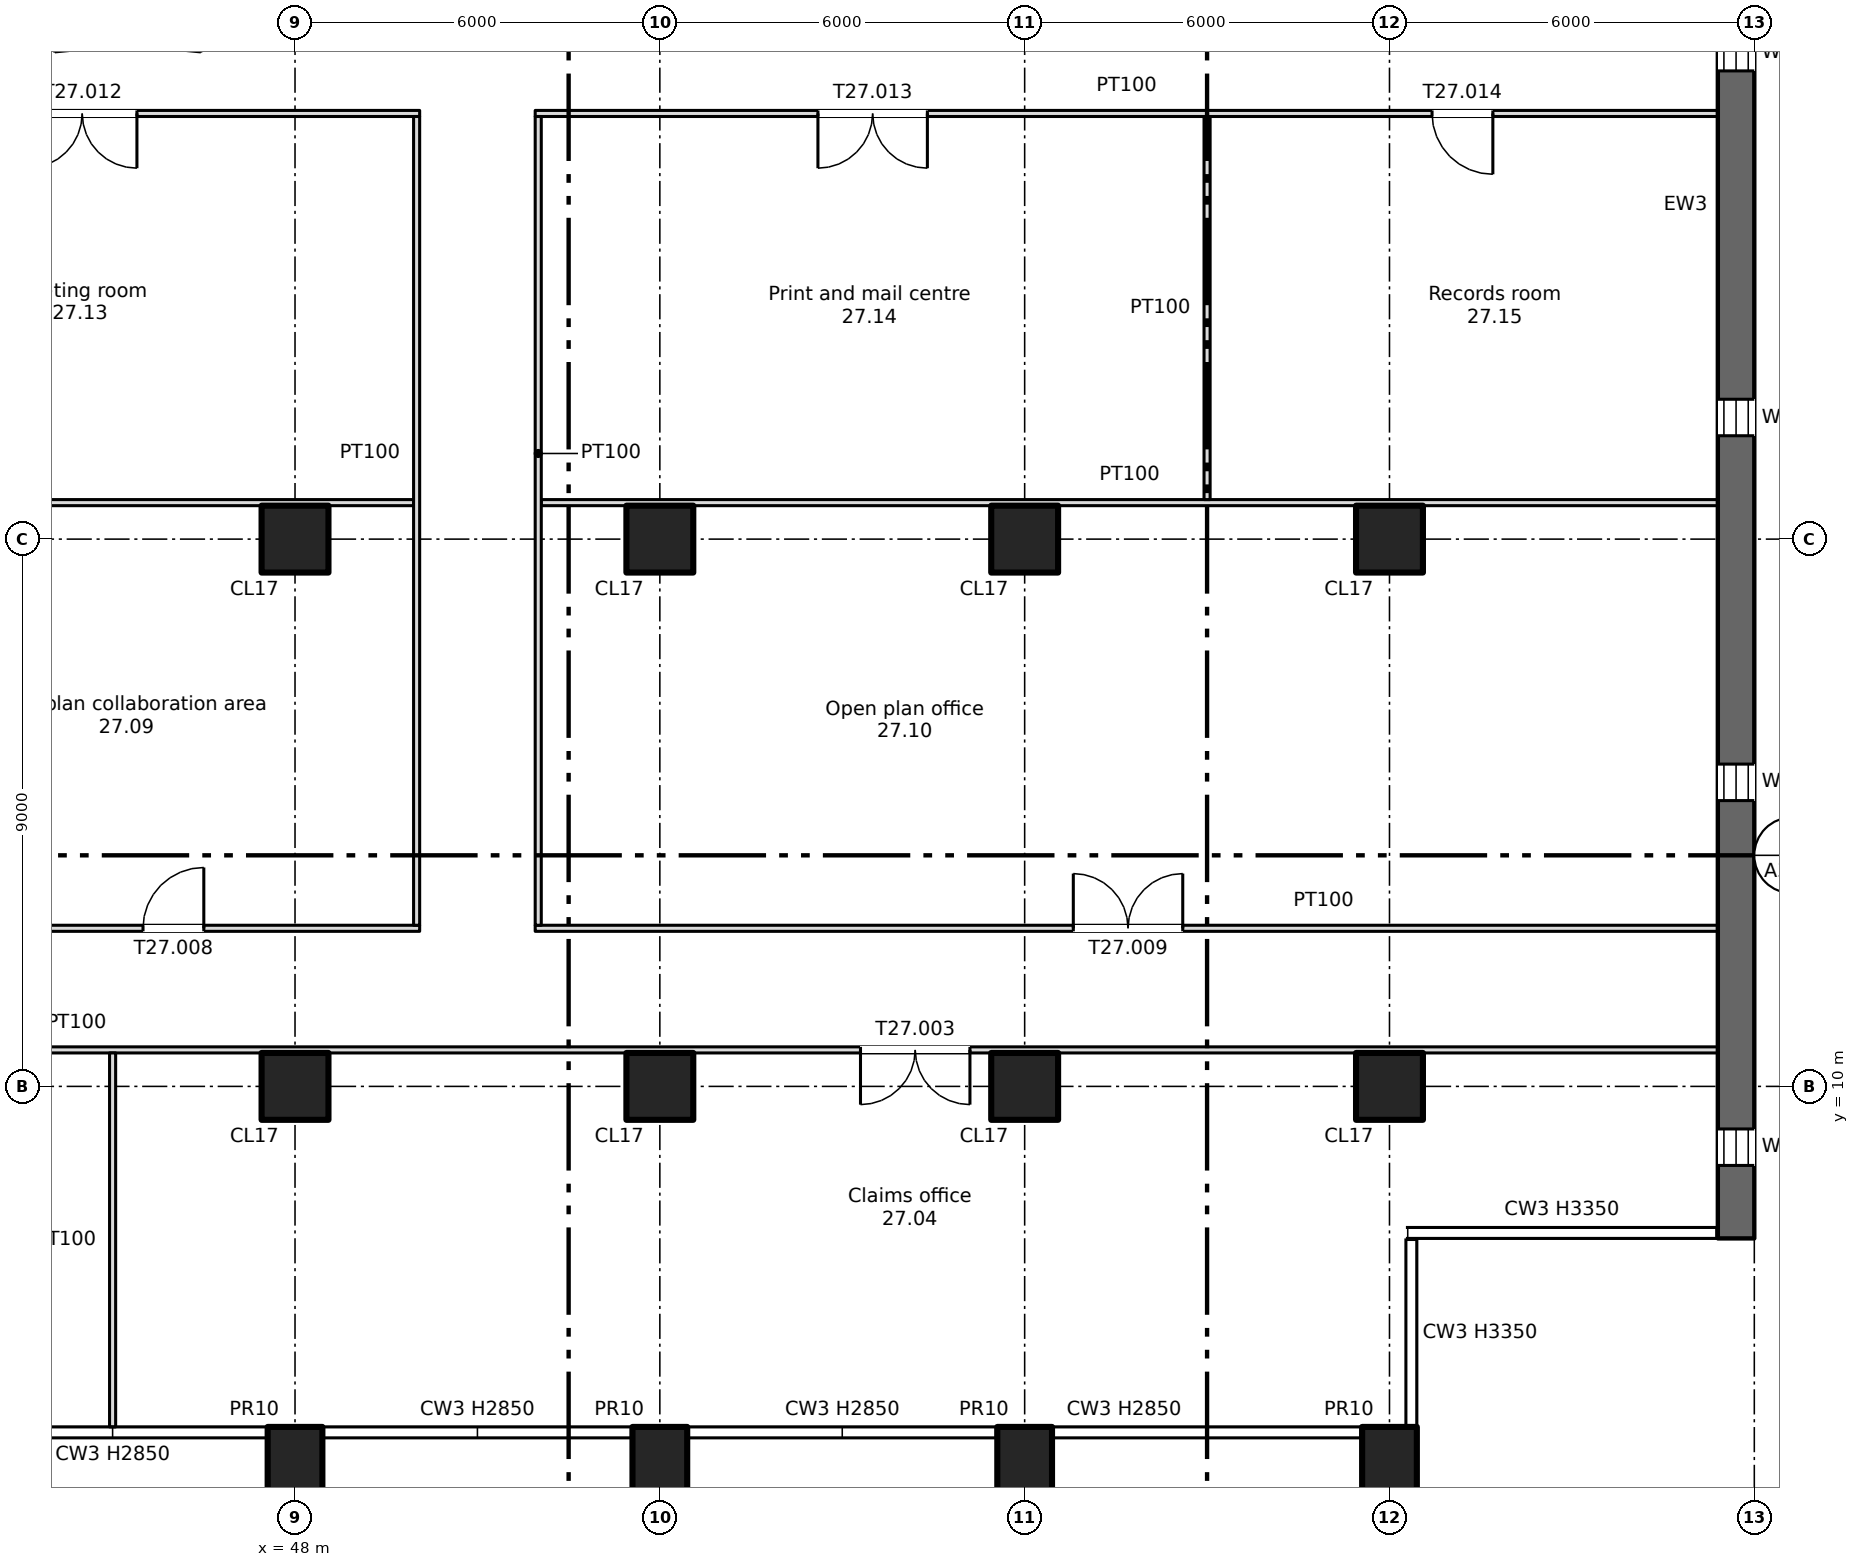
"""IFC4 building model, lengths in metres.
Left out: names, types, materials, properties, quantities, classifications, styles, units other than length and angle.
Written with IfcOpenShell. Run it as: python <this file> out.ifc"""

import sys

from ifc_helpers import new_model, si_unit, direction, frame, frame_2d, origin, origin_2d, place, context, subcontext, project, spatial, rectangle, extrude, element, fill, save


model = new_model("IFC4")
c1 = context("Model", 3, precision=1e-05, world=origin(), true_north=direction((0.0, 1.0)))
c2 = subcontext(c1, "Body", "Model", "MODEL_VIEW")
j1 = project(units=[si_unit("LENGTHUNIT", "METRE"), si_unit("PLANEANGLEUNIT", "RADIAN")], contexts=[c1])
p1 = place(None, origin())
s1 = spatial("IfcSite", under=j1, at=p1, CompositionType="ELEMENT")
p2 = place(p1, origin())
s2 = spatial("IfcBuilding", under=s1, at=p2, CompositionType="ELEMENT")
p3 = place(p2, frame((0.0, 0.0, 189.25)))
s3 = spatial("IfcBuildingStorey", under=s2, at=p3, CompositionType="ELEMENT", Elevation=189.25)
for number, where, z_axis, x_axis in (
    (1, (48.0, 3.7, -0.4), (0.0, 0.0, 1.0), (1.0, 0.0, 0.0)),
    (2, (54.0, 3.7, -0.4), (0.0, 0.0, 1.0), (1.0, 0.0, 0.0)),
    (3, (60.0, 3.7, -0.4), (0.0, 0.0, 1.0), (1.0, 0.0, 0.0)),
    (4, (66.0, 3.7, -0.4), (0.0, 0.0, 1.0), (1.0, 0.0, 0.0)),
):
    element("IfcColumn", number, at=place(p3, frame(where, z_axis=z_axis, x_axis=x_axis)), inside=s3, PredefinedType="COLUMN", context=c2, shape_type="SweptSolid", body=[
        extrude(rectangle(XDim=0.9, YDim=1.4, at=origin_2d()), origin(), (0.0, 0.0, 1.0), 3.75),
    ])
for number, where, z_axis, x_axis in (
    (5, (48.0, 10.0, 0.0), (0.0, 0.0, 1.0), (1.0, 0.0, 0.0)),
    (6, (48.0, 19.0, 0.0), (0.0, 0.0, 1.0), (1.0, 0.0, 0.0)),
    (7, (54.0, 10.0, 0.0), (0.0, 0.0, 1.0), (1.0, 0.0, 0.0)),
    (8, (54.0, 19.0, 0.0), (0.0, 0.0, 1.0), (1.0, 0.0, 0.0)),
    (9, (60.0, 10.0, 0.0), (0.0, 0.0, 1.0), (1.0, 0.0, 0.0)),
    (10, (60.0, 19.0, 0.0), (0.0, 0.0, 1.0), (1.0, 0.0, 0.0)),
    (11, (66.0, 10.0, 0.0), (0.0, 0.0, 1.0), (1.0, 0.0, 0.0)),
    (12, (66.0, 19.0, 0.0), (0.0, 0.0, 1.0), (1.0, 0.0, 0.0)),
):
    element("IfcColumn", number, at=place(p3, frame(where, z_axis=z_axis, x_axis=x_axis)), inside=s3, PredefinedType="COLUMN", context=c2, shape_type="SweptSolid", body=[
        extrude(rectangle(XDim=1.1, YDim=1.1, at=origin_2d()), origin(), (0.0, 0.0, 1.0), 3.35),
    ])
p4 = place(p3, frame((71.7, 7.5, 0.0), z_axis=(0.0, 0.0, 1.0), x_axis=(0.0, 1.0, 0.0)))
e13 = element("IfcWall", 13, at=p4, inside=s3, PredefinedType="SHEAR", context=c2, shape_type="SweptSolid", body=[
    extrude(rectangle(XDim=34.0, YDim=0.6, at=frame_2d((17.0, 0.0))), origin(), (0.0, 0.0, 1.0), 3.35),
])
p5 = place(p4, frame((1.2, 0.0, 0.6)))
e14 = element("IfcOpeningElement", 14, at=p5, cuts=e13, PredefinedType="OPENING", context=c2, shape_type="SweptSolid", body=[
    extrude(rectangle(XDim=0.6, YDim=2.4, at=frame_2d((0.3, 1.2))), frame((0.0, 0.31, 0.0), z_axis=(0.0, -1.0, 0.0), x_axis=(1.0, 0.0, 0.0)), (0.0, 0.0, 1.0), 0.62),
])
p6 = place(p4, frame((7.2, 0.0, 0.6)))
e15 = element("IfcOpeningElement", 15, at=p6, cuts=e13, PredefinedType="OPENING", context=c2, shape_type="SweptSolid", body=[
    extrude(rectangle(XDim=0.6, YDim=2.4, at=frame_2d((0.3, 1.2))), frame((0.0, 0.31, 0.0), z_axis=(0.0, -1.0, 0.0), x_axis=(1.0, 0.0, 0.0)), (0.0, 0.0, 1.0), 0.62),
])
p7 = place(p4, frame((13.2, 0.0, 0.6)))
e16 = element("IfcOpeningElement", 16, at=p7, cuts=e13, PredefinedType="OPENING", context=c2, shape_type="SweptSolid", body=[
    extrude(rectangle(XDim=0.6, YDim=2.4, at=frame_2d((0.3, 1.2))), frame((0.0, 0.31, 0.0), z_axis=(0.0, -1.0, 0.0), x_axis=(1.0, 0.0, 0.0)), (0.0, 0.0, 1.0), 0.62),
])
p8 = place(p4, frame((19.2, 0.0, 0.6)))
e17 = element("IfcOpeningElement", 17, at=p8, cuts=e13, PredefinedType="OPENING", context=c2, shape_type="SweptSolid", body=[
    extrude(rectangle(XDim=0.6, YDim=2.4, at=frame_2d((0.3, 1.2))), frame((0.0, 0.31, 0.0), z_axis=(0.0, -1.0, 0.0), x_axis=(1.0, 0.0, 0.0)), (0.0, 0.0, 1.0), 0.62),
])
p9 = place(p4, frame((25.2, 0.0, 0.6)))
e18 = element("IfcOpeningElement", 18, at=p9, cuts=e13, PredefinedType="OPENING", context=c2, shape_type="SweptSolid", body=[
    extrude(rectangle(XDim=0.6, YDim=2.4, at=frame_2d((0.3, 1.2))), frame((0.0, 0.31, 0.0), z_axis=(0.0, -1.0, 0.0), x_axis=(1.0, 0.0, 0.0)), (0.0, 0.0, 1.0), 0.62),
])
p10 = place(p4, frame((31.2, 0.0, 0.6)))
e19 = element("IfcOpeningElement", 19, at=p10, cuts=e13, PredefinedType="OPENING", context=c2, shape_type="SweptSolid", body=[
    extrude(rectangle(XDim=0.6, YDim=2.4, at=frame_2d((0.3, 1.2))), frame((0.0, 0.31, 0.0), z_axis=(0.0, -1.0, 0.0), x_axis=(1.0, 0.0, 0.0)), (0.0, 0.0, 1.0), 0.62),
])
p11 = place(p3, frame((6.6, 10.6, 0.0), z_axis=(0.0, 0.0, 1.0), x_axis=(1.0, 0.0, 0.0)))
e20 = element("IfcWall", 20, at=p11, inside=s3, PredefinedType="PARTITIONING", context=c2, shape_type="SweptSolid", body=[
    extrude(rectangle(XDim=64.8, YDim=0.1, at=frame_2d((32.4, 0.0))), origin(), (0.0, 0.0, 1.0), 3.35),
])
p12 = place(p11, frame((15.0, 0.0, 0.0)))
e21 = element("IfcOpeningElement", 21, at=p12, cuts=e20, PredefinedType="OPENING", context=c2, shape_type="SweptSolid", body=[
    extrude(rectangle(XDim=1.8, YDim=2.1, at=frame_2d((0.9, 1.05))), frame((0.0, 0.06, 0.0), z_axis=(0.0, -1.0, 0.0), x_axis=(1.0, 0.0, 0.0)), (0.0, 0.0, 1.0), 0.12),
])
p13 = place(p11, frame((30.0, 0.0, 0.0)))
e22 = element("IfcOpeningElement", 22, at=p13, cuts=e20, PredefinedType="OPENING", context=c2, shape_type="SweptSolid", body=[
    extrude(rectangle(XDim=1.8, YDim=2.1, at=frame_2d((0.9, 1.05))), frame((0.0, 0.06, 0.0), z_axis=(0.0, -1.0, 0.0), x_axis=(1.0, 0.0, 0.0)), (0.0, 0.0, 1.0), 0.12),
])
p14 = place(p11, frame((50.7, 0.0, 0.0)))
e23 = element("IfcOpeningElement", 23, at=p14, cuts=e20, PredefinedType="OPENING", context=c2, shape_type="SweptSolid", body=[
    extrude(rectangle(XDim=1.8, YDim=2.1, at=frame_2d((0.9, 1.05))), frame((0.0, 0.06, 0.0), z_axis=(0.0, -1.0, 0.0), x_axis=(1.0, 0.0, 0.0)), (0.0, 0.0, 1.0), 0.12),
])
p15 = place(p11, frame((3.7, 0.0, 0.0)))
e24 = element("IfcOpeningElement", 24, at=p15, cuts=e20, PredefinedType="OPENING", context=c2, shape_type="SweptSolid", body=[
    extrude(rectangle(XDim=1.0, YDim=2.1, at=frame_2d((0.5, 1.05))), frame((0.0, 0.06, 0.0), z_axis=(0.0, -1.0, 0.0), x_axis=(1.0, 0.0, 0.0)), (0.0, 0.0, 1.0), 0.12),
])
p16 = place(p3, frame((27.95, 12.6, 0.0), z_axis=(0.0, 0.0, 1.0), x_axis=(1.0, 0.0, 0.0)))
e25 = element("IfcWall", 25, at=p16, inside=s3, PredefinedType="PARTITIONING", context=c2, shape_type="SweptSolid", body=[
    extrude(rectangle(XDim=22.1, YDim=0.1, at=frame_2d((11.05, 0.0))), origin(), (0.0, 0.0, 1.0), 3.35),
])
p17 = place(p16, frame((3.55, 0.0, 0.0)))
e26 = element("IfcOpeningElement", 26, at=p17, cuts=e25, PredefinedType="OPENING", context=c2, shape_type="SweptSolid", body=[
    extrude(rectangle(XDim=1.0, YDim=2.1, at=frame_2d((0.5, 1.05))), frame((0.0, 0.06, 0.0), z_axis=(0.0, -1.0, 0.0), x_axis=(1.0, 0.0, 0.0)), (0.0, 0.0, 1.0), 0.12),
])
p18 = place(p16, frame((10.55, 0.0, 0.0)))
e27 = element("IfcOpeningElement", 27, at=p18, cuts=e25, PredefinedType="OPENING", context=c2, shape_type="SweptSolid", body=[
    extrude(rectangle(XDim=1.0, YDim=2.1, at=frame_2d((0.5, 1.05))), frame((0.0, 0.06, 0.0), z_axis=(0.0, -1.0, 0.0), x_axis=(1.0, 0.0, 0.0)), (0.0, 0.0, 1.0), 0.12),
])
p19 = place(p16, frame((17.55, 0.0, 0.0)))
e28 = element("IfcOpeningElement", 28, at=p19, cuts=e25, PredefinedType="OPENING", context=c2, shape_type="SweptSolid", body=[
    extrude(rectangle(XDim=1.0, YDim=2.1, at=frame_2d((0.5, 1.05))), frame((0.0, 0.06, 0.0), z_axis=(0.0, -1.0, 0.0), x_axis=(1.0, 0.0, 0.0)), (0.0, 0.0, 1.0), 0.12),
])
p20 = place(p3, frame((51.95, 12.6, 0.0), z_axis=(0.0, 0.0, 1.0), x_axis=(1.0, 0.0, 0.0)))
e29 = element("IfcWall", 29, at=p20, inside=s3, PredefinedType="PARTITIONING", context=c2, shape_type="SweptSolid", body=[
    extrude(rectangle(XDim=19.45, YDim=0.1, at=frame_2d((9.725, 0.0))), origin(), (0.0, 0.0, 1.0), 3.35),
])
p21 = place(p20, frame((8.85, 0.0, 0.0)))
e30 = element("IfcOpeningElement", 30, at=p21, cuts=e29, PredefinedType="OPENING", context=c2, shape_type="SweptSolid", body=[
    extrude(rectangle(XDim=1.8, YDim=2.1, at=frame_2d((0.9, 1.05))), frame((0.0, 0.06, 0.0), z_axis=(0.0, -1.0, 0.0), x_axis=(1.0, 0.0, 0.0)), (0.0, 0.0, 1.0), 0.12),
])
p22 = place(p3, frame((28.05, 19.6, 0.0), z_axis=(0.0, 0.0, 1.0), x_axis=(1.0, 0.0, 0.0)))
e31 = element("IfcWall", 31, at=p22, inside=s3, PredefinedType="PARTITIONING", context=c2, shape_type="SweptSolid", body=[
    extrude(rectangle(XDim=21.9, YDim=0.1, at=frame_2d((10.95, 0.0))), origin(), (0.0, 0.0, 1.0), 3.35),
])
p23 = place(p3, frame((52.05, 19.6, 0.0), z_axis=(0.0, 0.0, 1.0), x_axis=(1.0, 0.0, 0.0)))
e32 = element("IfcWall", 32, at=p23, inside=s3, PredefinedType="PARTITIONING", context=c2, shape_type="SweptSolid", body=[
    extrude(rectangle(XDim=19.35, YDim=0.1, at=frame_2d((9.675, 0.0))), origin(), (0.0, 0.0, 1.0), 3.35),
])
p24 = place(p3, frame((27.95, 26.0, 0.0), z_axis=(0.0, 0.0, 1.0), x_axis=(1.0, 0.0, 0.0)))
e33 = element("IfcWall", 33, at=p24, inside=s3, PredefinedType="PARTITIONING", context=c2, shape_type="SweptSolid", body=[
    extrude(rectangle(XDim=22.1, YDim=0.1, at=frame_2d((11.05, 0.0))), origin(), (0.0, 0.0, 1.0), 3.35),
])
p25 = place(p24, frame((4.65, 0.0, 0.0)))
e34 = element("IfcOpeningElement", 34, at=p25, cuts=e33, PredefinedType="OPENING", context=c2, shape_type="SweptSolid", body=[
    extrude(rectangle(XDim=1.8, YDim=2.1, at=frame_2d((0.9, 1.05))), frame((0.0, 0.06, 0.0), z_axis=(0.0, -1.0, 0.0), x_axis=(1.0, 0.0, 0.0)), (0.0, 0.0, 1.0), 0.12),
])
p26 = place(p24, frame((15.65, 0.0, 0.0)))
e35 = element("IfcOpeningElement", 35, at=p26, cuts=e33, PredefinedType="OPENING", context=c2, shape_type="SweptSolid", body=[
    extrude(rectangle(XDim=1.8, YDim=2.1, at=frame_2d((0.9, 1.05))), frame((0.0, 0.06, 0.0), z_axis=(0.0, -1.0, 0.0), x_axis=(1.0, 0.0, 0.0)), (0.0, 0.0, 1.0), 0.12),
])
p27 = place(p3, frame((51.95, 26.0, 0.0), z_axis=(0.0, 0.0, 1.0), x_axis=(1.0, 0.0, 0.0)))
e36 = element("IfcWall", 36, at=p27, inside=s3, PredefinedType="PARTITIONING", context=c2, shape_type="SweptSolid", body=[
    extrude(rectangle(XDim=19.45, YDim=0.1, at=frame_2d((9.725, 0.0))), origin(), (0.0, 0.0, 1.0), 3.35),
])
p28 = place(p27, frame((4.65, 0.0, 0.0)))
e37 = element("IfcOpeningElement", 37, at=p28, cuts=e36, PredefinedType="OPENING", context=c2, shape_type="SweptSolid", body=[
    extrude(rectangle(XDim=1.8, YDim=2.1, at=frame_2d((0.9, 1.05))), frame((0.0, 0.06, 0.0), z_axis=(0.0, -1.0, 0.0), x_axis=(1.0, 0.0, 0.0)), (0.0, 0.0, 1.0), 0.12),
])
p29 = place(p27, frame((14.75, 0.0, 0.0)))
e38 = element("IfcOpeningElement", 38, at=p29, cuts=e36, PredefinedType="OPENING", context=c2, shape_type="SweptSolid", body=[
    extrude(rectangle(XDim=1.0, YDim=2.1, at=frame_2d((0.5, 1.05))), frame((0.0, 0.06, 0.0), z_axis=(0.0, -1.0, 0.0), x_axis=(1.0, 0.0, 0.0)), (0.0, 0.0, 1.0), 0.12),
])
p30 = place(p3, frame((45.0, 4.4, 0.0), z_axis=(0.0, 0.0, 1.0), x_axis=(0.0, 1.0, 0.0)))
e39 = element("IfcWall", 39, at=p30, inside=s3, PredefinedType="PARTITIONING", context=c2, shape_type="SweptSolid", body=[
    extrude(rectangle(XDim=6.15, YDim=0.1, at=frame_2d((3.075, 0.0))), origin(), (0.0, 0.0, 1.0), 3.35),
])
for number, where, z_axis, x_axis in (
    (40, (50.0, 12.65, 0.0), (0.0, 0.0, 1.0), (0.0, 1.0, 0.0)),
    (41, (52.0, 12.65, 0.0), (0.0, 0.0, 1.0), (0.0, 1.0, 0.0)),
):
    element("IfcWall", number, at=place(p3, frame(where, z_axis=z_axis, x_axis=x_axis)), inside=s3, PredefinedType="PARTITIONING", context=c2, shape_type="SweptSolid", body=[
        extrude(rectangle(XDim=13.3, YDim=0.1, at=frame_2d((6.65, 0.0))), origin(), (0.0, 0.0, 1.0), 3.35),
    ])
p31 = place(p3, frame((63.0, 19.65, 0.0), z_axis=(0.0, 0.0, 1.0), x_axis=(0.0, 1.0, 0.0)))
e42 = element("IfcWall", 42, at=p31, inside=s3, PredefinedType="PARTITIONING", context=c2, shape_type="SweptSolid", body=[
    extrude(rectangle(XDim=6.3, YDim=0.1, at=frame_2d((3.15, 0.0))), origin(), (0.0, 0.0, 1.0), 3.35),
])
p32 = place(p5, origin())
e43 = element("IfcWindow", 43, at=p32, inside=s3, PartitioningType="SINGLE_PANEL", PredefinedType="WINDOW", context=c2, shape_type="SweptSolid", body=[
    extrude(rectangle(XDim=0.6, YDim=2.4, at=frame_2d((0.3, 1.2))), frame((0.0, 0.03, 0.0), z_axis=(0.0, -1.0, 0.0), x_axis=(1.0, 0.0, 0.0)), (0.0, 0.0, 1.0), 0.06),
])
fill(e14, e43)
p33 = place(p6, origin())
e44 = element("IfcWindow", 44, at=p33, inside=s3, PartitioningType="SINGLE_PANEL", PredefinedType="WINDOW", context=c2, shape_type="SweptSolid", body=[
    extrude(rectangle(XDim=0.6, YDim=2.4, at=frame_2d((0.3, 1.2))), frame((0.0, 0.03, 0.0), z_axis=(0.0, -1.0, 0.0), x_axis=(1.0, 0.0, 0.0)), (0.0, 0.0, 1.0), 0.06),
])
fill(e15, e44)
p34 = place(p7, origin())
e45 = element("IfcWindow", 45, at=p34, inside=s3, PartitioningType="SINGLE_PANEL", PredefinedType="WINDOW", context=c2, shape_type="SweptSolid", body=[
    extrude(rectangle(XDim=0.6, YDim=2.4, at=frame_2d((0.3, 1.2))), frame((0.0, 0.03, 0.0), z_axis=(0.0, -1.0, 0.0), x_axis=(1.0, 0.0, 0.0)), (0.0, 0.0, 1.0), 0.06),
])
fill(e16, e45)
p35 = place(p8, origin())
e46 = element("IfcWindow", 46, at=p35, inside=s3, PartitioningType="SINGLE_PANEL", PredefinedType="WINDOW", context=c2, shape_type="SweptSolid", body=[
    extrude(rectangle(XDim=0.6, YDim=2.4, at=frame_2d((0.3, 1.2))), frame((0.0, 0.03, 0.0), z_axis=(0.0, -1.0, 0.0), x_axis=(1.0, 0.0, 0.0)), (0.0, 0.0, 1.0), 0.06),
])
fill(e17, e46)
p36 = place(p14, origin())
e47 = element("IfcDoor", 47, at=p36, inside=s3, OperationType="DOUBLE_DOOR_SINGLE_SWING", PredefinedType="DOOR", context=c2, shape_type="SweptSolid", body=[
    extrude(rectangle(XDim=1.8, YDim=2.1, at=frame_2d((0.9, 1.05))), frame((0.0, 0.025, 0.0), z_axis=(0.0, -1.0, 0.0), x_axis=(1.0, 0.0, 0.0)), (0.0, 0.0, 1.0), 0.05),
])
fill(e23, e47)
p37 = place(p19, origin())
e48 = element("IfcDoor", 48, at=p37, inside=s3, OperationType="SINGLE_SWING_RIGHT", PredefinedType="DOOR", context=c2, shape_type="SweptSolid", body=[
    extrude(rectangle(XDim=1.0, YDim=2.1, at=frame_2d((0.5, 1.05))), frame((0.0, 0.025, 0.0), z_axis=(0.0, -1.0, 0.0), x_axis=(1.0, 0.0, 0.0)), (0.0, 0.0, 1.0), 0.05),
])
fill(e28, e48)
p38 = place(p21, origin())
e49 = element("IfcDoor", 49, at=p38, inside=s3, OperationType="DOUBLE_DOOR_SINGLE_SWING", PredefinedType="DOOR", context=c2, shape_type="SweptSolid", body=[
    extrude(rectangle(XDim=1.8, YDim=2.1, at=frame_2d((0.9, 1.05))), frame((0.0, 0.025, 0.0), z_axis=(0.0, -1.0, 0.0), x_axis=(1.0, 0.0, 0.0)), (0.0, 0.0, 1.0), 0.05),
])
fill(e30, e49)
p39 = place(p26, origin())
e50 = element("IfcDoor", 50, at=p39, inside=s3, OperationType="DOUBLE_DOOR_SINGLE_SWING", PredefinedType="DOOR", context=c2, shape_type="SweptSolid", body=[
    extrude(rectangle(XDim=1.8, YDim=2.1, at=frame_2d((0.9, 1.05))), frame((0.0, 0.025, 0.0), z_axis=(0.0, -1.0, 0.0), x_axis=(1.0, 0.0, 0.0)), (0.0, 0.0, 1.0), 0.05),
])
fill(e35, e50)
p40 = place(p28, origin())
e51 = element("IfcDoor", 51, at=p40, inside=s3, OperationType="DOUBLE_DOOR_SINGLE_SWING", PredefinedType="DOOR", context=c2, shape_type="SweptSolid", body=[
    extrude(rectangle(XDim=1.8, YDim=2.1, at=frame_2d((0.9, 1.05))), frame((0.0, 0.025, 0.0), z_axis=(0.0, -1.0, 0.0), x_axis=(1.0, 0.0, 0.0)), (0.0, 0.0, 1.0), 0.05),
])
fill(e37, e51)
p41 = place(p29, origin())
e52 = element("IfcDoor", 52, at=p41, inside=s3, OperationType="SINGLE_SWING_RIGHT", PredefinedType="DOOR", context=c2, shape_type="SweptSolid", body=[
    extrude(rectangle(XDim=1.0, YDim=2.1, at=frame_2d((0.5, 1.05))), frame((0.0, 0.025, 0.0), z_axis=(0.0, -1.0, 0.0), x_axis=(1.0, 0.0, 0.0)), (0.0, 0.0, 1.0), 0.05),
])
fill(e38, e52)
save(model, sys.argv[1])
